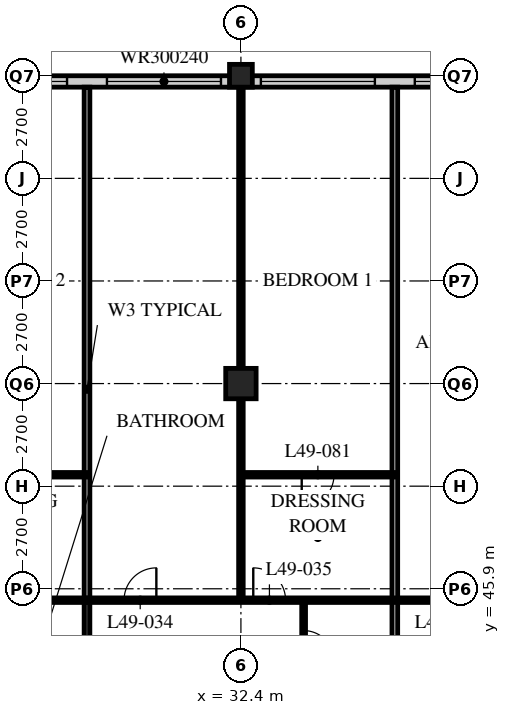
"""IFC4 building model, lengths in metres.
Left out: names, types, materials, properties, quantities, classifications, styles, units other than length and angle.
Written with IfcOpenShell. Run it as: python <this file> out.ifc"""

import sys

from ifc_helpers import new_model, si_unit, direction, frame, frame_2d, origin, origin_2d, place, context, subcontext, project, spatial, rectangle, hollow_rectangle, extrude, element, fill, save


model = new_model("IFC4")
c1 = context("Model", 3, precision=1e-05, world=origin(), true_north=direction((0.0, 1.0)))
c2 = subcontext(c1, "Body", "Model", "MODEL_VIEW")
j1 = project(units=[si_unit("LENGTHUNIT", "METRE"), si_unit("PLANEANGLEUNIT", "RADIAN")], contexts=[c1])
p1 = place(None, origin())
s1 = spatial("IfcSite", under=j1, at=p1, CompositionType="ELEMENT")
p2 = place(p1, origin())
s2 = spatial("IfcBuilding", under=s1, at=p2, CompositionType="ELEMENT")
p3 = place(p2, frame((0.0, 0.0, 192.0)))
s3 = spatial("IfcBuildingStorey", under=s2, at=p3, CompositionType="ELEMENT", Elevation=192.0)
p4 = place(p3, frame((32.4, 51.3, 0.0), z_axis=(0.0, 0.0, 1.0), x_axis=(1.0, 0.0, 0.0)))
e1 = element("IfcColumn", 1, at=p4, inside=s3, PredefinedType="COLUMN", context=c2, shape_type="SweptSolid", body=[
    extrude(hollow_rectangle(XDim=0.8, YDim=0.8, WallThickness=0.08, at=origin_2d()), origin(), (0.0, 0.0, 1.0), 3.6),
])
p5 = place(p3, frame((32.4, 59.4, 0.0), z_axis=(0.0, 0.0, 1.0), x_axis=(1.0, 0.0, 0.0)))
e2 = element("IfcColumn", 2, at=p5, inside=s3, PredefinedType="COLUMN", context=c2, shape_type="SweptSolid", body=[
    extrude(hollow_rectangle(XDim=0.6, YDim=0.6, WallThickness=0.05, at=origin_2d()), origin(), (0.0, 0.0, 1.0), 3.6),
])
p6 = place(p3, frame((48.3, 59.25, 0.0), z_axis=(0.0, 0.0, 1.0), x_axis=(-1.0, 0.0, 0.0)))
e3 = element("IfcWall", 3, at=p6, inside=s3, PredefinedType="SOLIDWALL", context=c2, shape_type="SweptSolid", body=[
    extrude(rectangle(XDim=40.2, YDim=0.3, at=frame_2d((20.1, 0.0))), origin(), (0.0, 0.0, 1.0), 3.39),
])
p7 = place(p6, frame((0.225, 0.0, 0.6)))
e4 = element("IfcOpeningElement", 4, at=p7, cuts=e3, PredefinedType="OPENING", context=c2, shape_type="SweptSolid", body=[
    extrude(rectangle(XDim=3.0, YDim=2.4, at=frame_2d((1.5, 1.2))), frame((0.0, 0.16, 0.0), z_axis=(0.0, -1.0, 0.0), x_axis=(1.0, 0.0, 0.0)), (0.0, 0.0, 1.0), 0.32),
])
p8 = place(p6, frame((4.275, 0.0, 0.6)))
e5 = element("IfcOpeningElement", 5, at=p8, cuts=e3, PredefinedType="OPENING", context=c2, shape_type="SweptSolid", body=[
    extrude(rectangle(XDim=3.0, YDim=2.4, at=frame_2d((1.5, 1.2))), frame((0.0, 0.16, 0.0), z_axis=(0.0, -1.0, 0.0), x_axis=(1.0, 0.0, 0.0)), (0.0, 0.0, 1.0), 0.32),
])
p9 = place(p6, frame((8.325, 0.0, 0.6)))
e6 = element("IfcOpeningElement", 6, at=p9, cuts=e3, PredefinedType="OPENING", context=c2, shape_type="SweptSolid", body=[
    extrude(rectangle(XDim=3.0, YDim=2.4, at=frame_2d((1.5, 1.2))), frame((0.0, 0.16, 0.0), z_axis=(0.0, -1.0, 0.0), x_axis=(1.0, 0.0, 0.0)), (0.0, 0.0, 1.0), 0.32),
])
p10 = place(p6, frame((12.375, 0.0, 0.6)))
e7 = element("IfcOpeningElement", 7, at=p10, cuts=e3, PredefinedType="OPENING", context=c2, shape_type="SweptSolid", body=[
    extrude(rectangle(XDim=3.0, YDim=2.4, at=frame_2d((1.5, 1.2))), frame((0.0, 0.16, 0.0), z_axis=(0.0, -1.0, 0.0), x_axis=(1.0, 0.0, 0.0)), (0.0, 0.0, 1.0), 0.32),
])
p11 = place(p6, frame((16.425, 0.0, 0.6)))
e8 = element("IfcOpeningElement", 8, at=p11, cuts=e3, PredefinedType="OPENING", context=c2, shape_type="SweptSolid", body=[
    extrude(rectangle(XDim=3.0, YDim=2.4, at=frame_2d((1.5, 1.2))), frame((0.0, 0.16, 0.0), z_axis=(0.0, -1.0, 0.0), x_axis=(1.0, 0.0, 0.0)), (0.0, 0.0, 1.0), 0.32),
])
p12 = place(p6, frame((20.475, 0.0, 0.6)))
e9 = element("IfcOpeningElement", 9, at=p12, cuts=e3, PredefinedType="OPENING", context=c2, shape_type="SweptSolid", body=[
    extrude(rectangle(XDim=3.0, YDim=2.4, at=frame_2d((1.5, 1.2))), frame((0.0, 0.16, 0.0), z_axis=(0.0, -1.0, 0.0), x_axis=(1.0, 0.0, 0.0)), (0.0, 0.0, 1.0), 0.32),
])
p13 = place(p6, frame((24.525, 0.0, 0.6)))
e10 = element("IfcOpeningElement", 10, at=p13, cuts=e3, PredefinedType="OPENING", context=c2, shape_type="SweptSolid", body=[
    extrude(rectangle(XDim=3.0, YDim=2.4, at=frame_2d((1.5, 1.2))), frame((0.0, 0.16, 0.0), z_axis=(0.0, -1.0, 0.0), x_axis=(1.0, 0.0, 0.0)), (0.0, 0.0, 1.0), 0.32),
])
p14 = place(p6, frame((28.575, 0.0, 0.6)))
e11 = element("IfcOpeningElement", 11, at=p14, cuts=e3, PredefinedType="OPENING", context=c2, shape_type="SweptSolid", body=[
    extrude(rectangle(XDim=3.0, YDim=2.4, at=frame_2d((1.5, 1.2))), frame((0.0, 0.16, 0.0), z_axis=(0.0, -1.0, 0.0), x_axis=(1.0, 0.0, 0.0)), (0.0, 0.0, 1.0), 0.32),
])
p15 = place(p6, frame((32.625, 0.0, 0.6)))
e12 = element("IfcOpeningElement", 12, at=p15, cuts=e3, PredefinedType="OPENING", context=c2, shape_type="SweptSolid", body=[
    extrude(rectangle(XDim=3.0, YDim=2.4, at=frame_2d((1.5, 1.2))), frame((0.0, 0.16, 0.0), z_axis=(0.0, -1.0, 0.0), x_axis=(1.0, 0.0, 0.0)), (0.0, 0.0, 1.0), 0.32),
])
p16 = place(p6, frame((36.675, 0.0, 0.6)))
e13 = element("IfcOpeningElement", 13, at=p16, cuts=e3, PredefinedType="OPENING", context=c2, shape_type="SweptSolid", body=[
    extrude(rectangle(XDim=3.0, YDim=2.4, at=frame_2d((1.5, 1.2))), frame((0.0, 0.16, 0.0), z_axis=(0.0, -1.0, 0.0), x_axis=(1.0, 0.0, 0.0)), (0.0, 0.0, 1.0), 0.32),
])
p17 = place(p3, frame((28.35, 43.2, 0.0), z_axis=(0.0, 0.0, 1.0), x_axis=(0.0, 1.0, 0.0)))
e14 = element("IfcWall", 14, at=p17, inside=s3, PredefinedType="PARTITIONING", context=c2, shape_type="SweptSolid", body=[
    extrude(rectangle(XDim=15.9, YDim=0.15, at=frame_2d((7.95, 0.0))), origin(), (0.0, 0.0, 1.0), 3.39),
])
p18 = place(p3, frame((34.05, 43.2, 0.0), z_axis=(0.0, 0.0, 1.0), x_axis=(0.0, 1.0, 0.0)))
e15 = element("IfcWall", 15, at=p18, inside=s3, PredefinedType="PARTITIONING", context=c2, shape_type="SweptSolid", body=[
    extrude(rectangle(XDim=2.4, YDim=0.1, at=frame_2d((1.2, 0.0))), origin(), (0.0, 0.0, 1.0), 3.39),
])
p19 = place(p18, frame((0.8, 0.0, 0.0)))
e16 = element("IfcOpeningElement", 16, at=p19, cuts=e15, PredefinedType="OPENING", context=c2, shape_type="SweptSolid", body=[
    extrude(rectangle(XDim=0.8, YDim=2.1, at=frame_2d((0.4, 1.05))), frame((0.0, 0.06, 0.0), z_axis=(0.0, -1.0, 0.0), x_axis=(1.0, 0.0, 0.0)), (0.0, 0.0, 1.0), 0.12),
])
p20 = place(p3, frame((32.4, 45.6, 0.0), z_axis=(0.0, 0.0, 1.0), x_axis=(0.0, 1.0, 0.0)))
e17 = element("IfcWall", 17, at=p20, inside=s3, PredefinedType="PARTITIONING", context=c2, shape_type="SweptSolid", body=[
    extrude(rectangle(XDim=13.5, YDim=0.12, at=frame_2d((6.75, 0.0))), origin(), (0.0, 0.0, 1.0), 2.778),
])
p21 = place(p3, frame((36.45, 43.2, 0.0), z_axis=(0.0, 0.0, 1.0), x_axis=(0.0, 1.0, 0.0)))
e18 = element("IfcWall", 18, at=p21, inside=s3, PredefinedType="PARTITIONING", context=c2, shape_type="SweptSolid", body=[
    extrude(rectangle(XDim=15.9, YDim=0.15, at=frame_2d((7.95, 0.0))), origin(), (0.0, 0.0, 1.0), 3.39),
])
p22 = place(p3, frame((4.1, 45.6, 0.0), z_axis=(0.0, 0.0, 1.0), x_axis=(1.0, 0.0, 0.0)))
e19 = element("IfcWall", 19, at=p22, inside=s3, PredefinedType="PARTITIONING", context=c2, shape_type="SweptSolid", body=[
    extrude(rectangle(XDim=48.5, YDim=0.12, at=frame_2d((24.25, 0.0))), origin(), (0.0, 0.0, 1.0), 3.39),
])
p23 = place(p22, frame((9.025, 0.0, 0.0)))
e20 = element("IfcOpeningElement", 20, at=p23, cuts=e19, PredefinedType="OPENING", context=c2, shape_type="SweptSolid", body=[
    extrude(rectangle(XDim=0.85, YDim=2.1, at=frame_2d((0.425, 1.05))), frame((0.0, 0.07, 0.0), z_axis=(0.0, -1.0, 0.0), x_axis=(1.0, 0.0, 0.0)), (0.0, 0.0, 1.0), 0.14),
])
p24 = place(p22, frame((16.475, 0.0, 0.0)))
e21 = element("IfcOpeningElement", 21, at=p24, cuts=e19, PredefinedType="OPENING", context=c2, shape_type="SweptSolid", body=[
    extrude(rectangle(XDim=0.85, YDim=2.1, at=frame_2d((0.425, 1.05))), frame((0.0, 0.07, 0.0), z_axis=(0.0, -1.0, 0.0), x_axis=(1.0, 0.0, 0.0)), (0.0, 0.0, 1.0), 0.14),
])
p25 = place(p22, frame((20.525, 0.0, 0.0)))
e22 = element("IfcOpeningElement", 22, at=p25, cuts=e19, PredefinedType="OPENING", context=c2, shape_type="SweptSolid", body=[
    extrude(rectangle(XDim=0.85, YDim=2.1, at=frame_2d((0.425, 1.05))), frame((0.0, 0.07, 0.0), z_axis=(0.0, -1.0, 0.0), x_axis=(1.0, 0.0, 0.0)), (0.0, 0.0, 1.0), 0.14),
])
p26 = place(p22, frame((25.225, 0.0, 0.0)))
e23 = element("IfcOpeningElement", 23, at=p26, cuts=e19, PredefinedType="OPENING", context=c2, shape_type="SweptSolid", body=[
    extrude(rectangle(XDim=0.85, YDim=2.1, at=frame_2d((0.425, 1.05))), frame((0.0, 0.07, 0.0), z_axis=(0.0, -1.0, 0.0), x_axis=(1.0, 0.0, 0.0)), (0.0, 0.0, 1.0), 0.14),
])
p27 = place(p22, frame((28.625, 0.0, 0.0)))
e24 = element("IfcOpeningElement", 24, at=p27, cuts=e19, PredefinedType="OPENING", context=c2, shape_type="SweptSolid", body=[
    extrude(rectangle(XDim=0.85, YDim=2.1, at=frame_2d((0.425, 1.05))), frame((0.0, 0.07, 0.0), z_axis=(0.0, -1.0, 0.0), x_axis=(1.0, 0.0, 0.0)), (0.0, 0.0, 1.0), 0.14),
])
p28 = place(p22, frame((33.325, 0.0, 0.0)))
e25 = element("IfcOpeningElement", 25, at=p28, cuts=e19, PredefinedType="OPENING", context=c2, shape_type="SweptSolid", body=[
    extrude(rectangle(XDim=0.85, YDim=2.1, at=frame_2d((0.425, 1.05))), frame((0.0, 0.07, 0.0), z_axis=(0.0, -1.0, 0.0), x_axis=(1.0, 0.0, 0.0)), (0.0, 0.0, 1.0), 0.14),
])
p29 = place(p22, frame((36.725, 0.0, 0.0)))
e26 = element("IfcOpeningElement", 26, at=p29, cuts=e19, PredefinedType="OPENING", context=c2, shape_type="SweptSolid", body=[
    extrude(rectangle(XDim=0.85, YDim=2.1, at=frame_2d((0.425, 1.05))), frame((0.0, 0.07, 0.0), z_axis=(0.0, -1.0, 0.0), x_axis=(1.0, 0.0, 0.0)), (0.0, 0.0, 1.0), 0.14),
])
p30 = place(p22, frame((40.925, 0.0, 0.0)))
e27 = element("IfcOpeningElement", 27, at=p30, cuts=e19, PredefinedType="OPENING", context=c2, shape_type="SweptSolid", body=[
    extrude(rectangle(XDim=0.85, YDim=2.1, at=frame_2d((0.425, 1.05))), frame((0.0, 0.07, 0.0), z_axis=(0.0, -1.0, 0.0), x_axis=(1.0, 0.0, 0.0)), (0.0, 0.0, 1.0), 0.14),
])
p31 = place(p22, frame((44.775, 0.0, 0.0)))
e28 = element("IfcOpeningElement", 28, at=p31, cuts=e19, PredefinedType="OPENING", context=c2, shape_type="SweptSolid", body=[
    extrude(rectangle(XDim=0.85, YDim=2.1, at=frame_2d((0.425, 1.05))), frame((0.0, 0.07, 0.0), z_axis=(0.0, -1.0, 0.0), x_axis=(1.0, 0.0, 0.0)), (0.0, 0.0, 1.0), 0.14),
])
p32 = place(p22, frame((6.725, 0.0, 0.0)))
e29 = element("IfcOpeningElement", 29, at=p32, cuts=e19, PredefinedType="OPENING", context=c2, shape_type="SweptSolid", body=[
    extrude(rectangle(XDim=0.85, YDim=2.1, at=frame_2d((0.425, 1.05))), frame((0.0, 0.07, 0.0), z_axis=(0.0, -1.0, 0.0), x_axis=(1.0, 0.0, 0.0)), (0.0, 0.0, 1.0), 0.14),
])
p33 = place(p22, frame((2.875, 0.0, 0.0)))
e30 = element("IfcOpeningElement", 30, at=p33, cuts=e19, PredefinedType="OPENING", context=c2, shape_type="SweptSolid", body=[
    extrude(rectangle(XDim=0.85, YDim=2.1, at=frame_2d((0.425, 1.05))), frame((0.0, 0.07, 0.0), z_axis=(0.0, -1.0, 0.0), x_axis=(1.0, 0.0, 0.0)), (0.0, 0.0, 1.0), 0.14),
])
p34 = place(p3, frame((24.3, 48.9, 0.0), z_axis=(0.0, 0.0, 1.0), x_axis=(1.0, 0.0, 0.0)))
e31 = element("IfcWall", 31, at=p34, inside=s3, PredefinedType="PARTITIONING", context=c2, shape_type="SweptSolid", body=[
    extrude(rectangle(XDim=4.05, YDim=0.12, at=frame_2d((2.025, 0.0))), origin(), (0.0, 0.0, 1.0), 3.39),
])
p35 = place(p34, frame((1.6, 0.0, 0.0)))
e32 = element("IfcOpeningElement", 32, at=p35, cuts=e31, PredefinedType="OPENING", context=c2, shape_type="SweptSolid", body=[
    extrude(rectangle(XDim=0.85, YDim=2.1, at=frame_2d((0.425, 1.05))), frame((0.0, 0.07, 0.0), z_axis=(0.0, -1.0, 0.0), x_axis=(1.0, 0.0, 0.0)), (0.0, 0.0, 1.0), 0.14),
])
p36 = place(p3, frame((32.4, 48.9, 0.0), z_axis=(0.0, 0.0, 1.0), x_axis=(1.0, 0.0, 0.0)))
e33 = element("IfcWall", 33, at=p36, inside=s3, PredefinedType="PARTITIONING", context=c2, shape_type="SweptSolid", body=[
    extrude(rectangle(XDim=4.05, YDim=0.12, at=frame_2d((2.025, 0.0))), origin(), (0.0, 0.0, 1.0), 3.39),
])
p37 = place(p36, frame((1.6, 0.0, 0.0)))
e34 = element("IfcOpeningElement", 34, at=p37, cuts=e33, PredefinedType="OPENING", context=c2, shape_type="SweptSolid", body=[
    extrude(rectangle(XDim=0.85, YDim=2.1, at=frame_2d((0.425, 1.05))), frame((0.0, 0.07, 0.0), z_axis=(0.0, -1.0, 0.0), x_axis=(1.0, 0.0, 0.0)), (0.0, 0.0, 1.0), 0.14),
])
p38 = place(p9, origin())
e35 = element("IfcWindow", 35, at=p38, inside=s3, PartitioningType="SINGLE_PANEL", PredefinedType="WINDOW", context=c2, shape_type="SweptSolid", body=[
    extrude(rectangle(XDim=3.0, YDim=2.4, at=frame_2d((1.5, 1.2))), frame((0.0, 0.03, 0.0), z_axis=(0.0, -1.0, 0.0), x_axis=(1.0, 0.0, 0.0)), (0.0, 0.0, 1.0), 0.06),
])
fill(e6, e35)
p39 = place(p10, origin())
e36 = element("IfcWindow", 36, at=p39, inside=s3, PartitioningType="SINGLE_PANEL", PredefinedType="WINDOW", context=c2, shape_type="SweptSolid", body=[
    extrude(rectangle(XDim=3.0, YDim=2.4, at=frame_2d((1.5, 1.2))), frame((0.0, 0.03, 0.0), z_axis=(0.0, -1.0, 0.0), x_axis=(1.0, 0.0, 0.0)), (0.0, 0.0, 1.0), 0.06),
])
fill(e7, e36)
p40 = place(p11, origin())
e37 = element("IfcWindow", 37, at=p40, inside=s3, PartitioningType="SINGLE_PANEL", PredefinedType="WINDOW", context=c2, shape_type="SweptSolid", body=[
    extrude(rectangle(XDim=3.0, YDim=2.4, at=frame_2d((1.5, 1.2))), frame((0.0, 0.03, 0.0), z_axis=(0.0, -1.0, 0.0), x_axis=(1.0, 0.0, 0.0)), (0.0, 0.0, 1.0), 0.06),
])
fill(e8, e37)
p41 = place(p12, origin())
e38 = element("IfcWindow", 38, at=p41, inside=s3, PartitioningType="SINGLE_PANEL", PredefinedType="WINDOW", context=c2, shape_type="SweptSolid", body=[
    extrude(rectangle(XDim=3.0, YDim=2.4, at=frame_2d((1.5, 1.2))), frame((0.0, 0.03, 0.0), z_axis=(0.0, -1.0, 0.0), x_axis=(1.0, 0.0, 0.0)), (0.0, 0.0, 1.0), 0.06),
])
fill(e9, e38)
p42 = place(p19, origin())
e39 = element("IfcDoor", 39, at=p42, inside=s3, OperationType="SINGLE_SWING_RIGHT", PredefinedType="DOOR", context=c2, shape_type="SweptSolid", body=[
    extrude(rectangle(XDim=0.8, YDim=2.1, at=frame_2d((0.4, 1.05))), frame((0.0, 0.025, 0.0), z_axis=(0.0, -1.0, 0.0), x_axis=(1.0, 0.0, 0.0)), (0.0, 0.0, 1.0), 0.05),
])
fill(e16, e39)
p43 = place(p26, origin())
e40 = element("IfcDoor", 40, at=p43, inside=s3, OperationType="SINGLE_SWING_RIGHT", PredefinedType="DOOR", context=c2, shape_type="SweptSolid", body=[
    extrude(rectangle(XDim=0.85, YDim=2.1, at=frame_2d((0.425, 1.05))), frame((0.0, 0.025, 0.0), z_axis=(0.0, -1.0, 0.0), x_axis=(1.0, 0.0, 0.0)), (0.0, 0.0, 1.0), 0.05),
])
fill(e23, e40)
p44 = place(p27, origin())
e41 = element("IfcDoor", 41, at=p44, inside=s3, OperationType="SINGLE_SWING_LEFT", PredefinedType="DOOR", context=c2, shape_type="SweptSolid", body=[
    extrude(rectangle(XDim=0.85, YDim=2.1, at=frame_2d((0.425, 1.05))), frame((0.0, 0.025, 0.0), z_axis=(0.0, -1.0, 0.0), x_axis=(1.0, 0.0, 0.0)), (0.0, 0.0, 1.0), 0.05),
])
fill(e24, e41)
p45 = place(p37, origin())
e42 = element("IfcDoor", 42, at=p45, inside=s3, OperationType="SINGLE_SWING_RIGHT", PredefinedType="DOOR", context=c2, shape_type="SweptSolid", body=[
    extrude(rectangle(XDim=0.85, YDim=2.1, at=frame_2d((0.425, 1.05))), frame((0.0, 0.025, 0.0), z_axis=(0.0, -1.0, 0.0), x_axis=(1.0, 0.0, 0.0)), (0.0, 0.0, 1.0), 0.05),
])
fill(e34, e42)
save(model, sys.argv[1])
